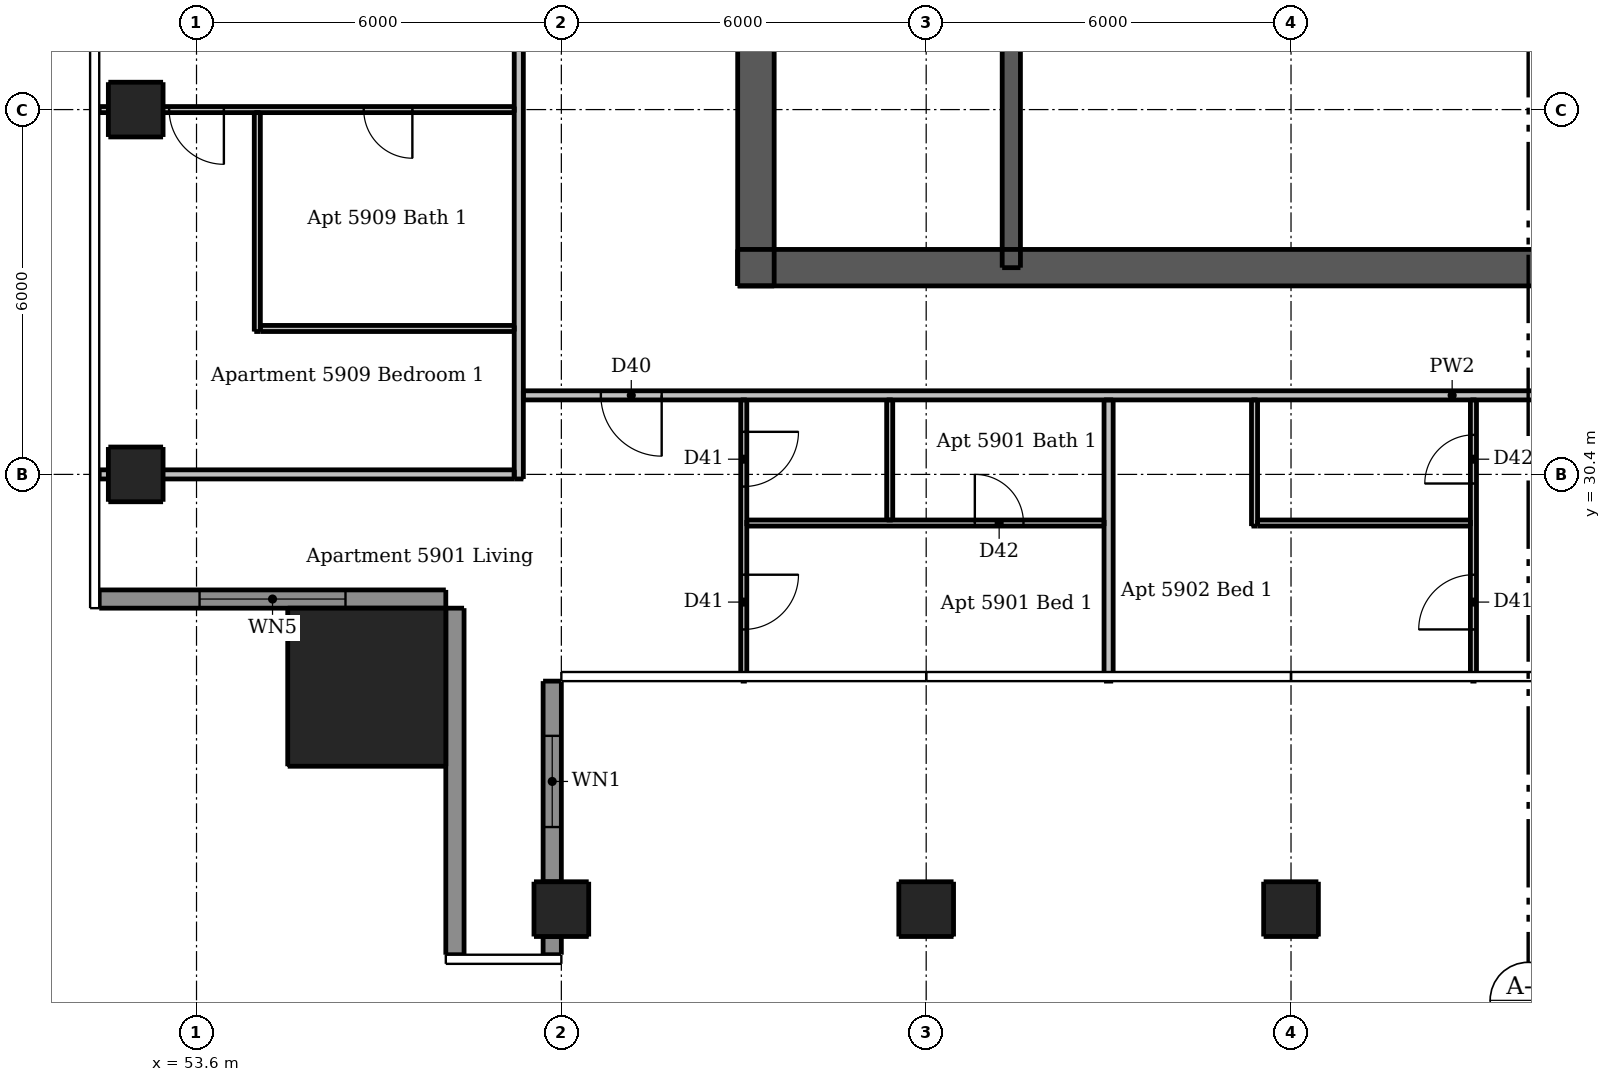
"""IFC4 building model, lengths in metres.
Left out: names, types, materials, properties, quantities, classifications, styles, units other than length and angle.
Written with IfcOpenShell. Run it as: python <this file> out.ifc"""

import sys

from ifc_helpers import new_model, si_unit, direction, frame, frame_2d, origin, origin_2d, place, context, subcontext, project, spatial, rectangle, extrude, element, fill, save


model = new_model("IFC4")
c1 = context("Model", 3, precision=1e-05, world=origin(), true_north=direction((0.0, 1.0)))
c2 = subcontext(c1, "Body", "Model", "MODEL_VIEW")
j1 = project(units=[si_unit("LENGTHUNIT", "METRE"), si_unit("PLANEANGLEUNIT", "RADIAN")], contexts=[c1])
p1 = place(None, origin())
s1 = spatial("IfcSite", under=j1, at=p1, CompositionType="ELEMENT")
p2 = place(p1, origin())
s2 = spatial("IfcBuilding", under=s1, at=p2, CompositionType="ELEMENT")
p3 = place(p2, frame((0.0, 0.0, 220.0)))
s3 = spatial("IfcBuildingStorey", under=s2, at=p3, CompositionType="ELEMENT", Elevation=220.0)
p4 = place(p3, frame((62.5, 33.8, 0.0), z_axis=(0.0, 0.0, 1.0), x_axis=(1.0, 0.0, 0.0)))
e1 = element("IfcWall", 1, at=p4, inside=s3, PredefinedType="SHEAR", context=c2, shape_type="SweptSolid", body=[
    extrude(rectangle(XDim=24.0, YDim=0.6, at=frame_2d((12.0, 0.0))), origin(), (0.0, 0.0, 1.0), 3.05),
])
p5 = place(p4, frame((1.925, 0.0, 0.0)))
e2 = element("IfcOpeningElement", 2, at=p5, cuts=e1, PredefinedType="OPENING", context=c2, shape_type="SweptSolid", body=[
    extrude(rectangle(XDim=1.1, YDim=2.1, at=frame_2d((0.55, 1.05))), frame((0.0, 0.31, 0.0), z_axis=(0.0, -1.0, 0.0), x_axis=(1.0, 0.0, 0.0)), (0.0, 0.0, 1.0), 0.62),
])
p6 = place(p4, frame((20.975, 0.0, 0.0)))
e3 = element("IfcOpeningElement", 3, at=p6, cuts=e1, PredefinedType="OPENING", context=c2, shape_type="SweptSolid", body=[
    extrude(rectangle(XDim=1.1, YDim=2.1, at=frame_2d((0.55, 1.05))), frame((0.0, 0.31, 0.0), z_axis=(0.0, -1.0, 0.0), x_axis=(1.0, 0.0, 0.0)), (0.0, 0.0, 1.0), 0.62),
])
p7 = place(p4, frame((8.0, 0.0, 0.0)))
e4 = element("IfcOpeningElement", 4, at=p7, cuts=e1, PredefinedType="OPENING", context=c2, shape_type="SweptSolid", body=[
    extrude(rectangle(XDim=1.1, YDim=2.1, at=frame_2d((0.55, 1.05))), frame((0.0, 0.31, 0.0), z_axis=(0.0, -1.0, 0.0), x_axis=(1.0, 0.0, 0.0)), (0.0, 0.0, 1.0), 0.62),
])
p8 = place(p4, frame((17.512, 0.0, 0.0)))
e5 = element("IfcOpeningElement", 5, at=p8, cuts=e1, PredefinedType="OPENING", context=c2, shape_type="SweptSolid", body=[
    extrude(rectangle(XDim=0.9, YDim=2.1, at=frame_2d((0.45, 1.05))), frame((0.0, 0.31, 0.0), z_axis=(0.0, -1.0, 0.0), x_axis=(1.0, 0.0, 0.0)), (0.0, 0.0, 1.0), 0.62),
])
p9 = place(p3, frame((62.8, 33.5, 0.0), z_axis=(0.0, 0.0, 1.0), x_axis=(0.0, 1.0, 0.0)))
e6 = element("IfcWall", 6, at=p9, inside=s3, PredefinedType="SHEAR", context=c2, shape_type="SweptSolid", body=[
    extrude(rectangle(XDim=24.0, YDim=0.6, at=frame_2d((12.0, 0.0))), origin(), (0.0, 0.0, 1.0), 3.05),
])
p10 = place(p9, frame((11.2, 0.0, 0.0)))
e7 = element("IfcOpeningElement", 7, at=p10, cuts=e6, PredefinedType="OPENING", context=c2, shape_type="SweptSolid", body=[
    extrude(rectangle(XDim=1.6, YDim=2.1, at=frame_2d((0.8, 1.05))), frame((0.0, 0.31, 0.0), z_axis=(0.0, -1.0, 0.0), x_axis=(1.0, 0.0, 0.0)), (0.0, 0.0, 1.0), 0.62),
])
p11 = place(p3, frame((67.0, 33.8, 0.0), z_axis=(0.0, 0.0, 1.0), x_axis=(0.0, 1.0, 0.0)))
e8 = element("IfcWall", 8, at=p11, inside=s3, PredefinedType="SHEAR", context=c2, shape_type="SweptSolid", body=[
    extrude(rectangle(XDim=10.1, YDim=0.3, at=frame_2d((5.05, 0.0))), origin(), (0.0, 0.0, 1.0), 3.05),
])
p12 = place(p11, frame((0.5, 0.0, 0.0)))
e9 = element("IfcOpeningElement", 9, at=p12, cuts=e8, PredefinedType="OPENING", context=c2, shape_type="SweptSolid", body=[
    extrude(rectangle(XDim=1.1, YDim=2.1, at=frame_2d((0.55, 1.05))), frame((0.0, 0.16, 0.0), z_axis=(0.0, -1.0, 0.0), x_axis=(1.0, 0.0, 0.0)), (0.0, 0.0, 1.0), 0.32),
])
for number, where, z_axis, x_axis in (
    (10, (59.6, 23.25, 0.0), (0.0, 0.0, 1.0), (1.0, 0.0, 0.0)),
    (11, (65.6, 23.25, 0.0), (0.0, 0.0, 1.0), (1.0, 0.0, 0.0)),
    (12, (71.6, 23.25, 0.0), (0.0, 0.0, 1.0), (1.0, 0.0, 0.0)),
    (13, (52.6, 30.4, 0.0), (0.0, 0.0, 1.0), (1.0, 0.0, 0.0)),
    (14, (52.6, 36.4, 0.0), (0.0, 0.0, 1.0), (1.0, 0.0, 0.0)),
):
    element("IfcColumn", number, at=place(p3, frame(where, z_axis=z_axis, x_axis=x_axis)), inside=s3, PredefinedType="COLUMN", context=c2, shape_type="SweptSolid", body=[
        extrude(rectangle(XDim=0.9, YDim=0.9, at=origin_2d()), origin(), (0.0, 0.0, 1.0), 3.05),
    ])
p13 = place(p3, frame((56.4, 26.9, 0.0), z_axis=(0.0, 0.0, 1.0), x_axis=(1.0, 0.0, 0.0)))
e15 = element("IfcColumn", 15, at=p13, inside=s3, PredefinedType="COLUMN", context=c2, shape_type="SweptSolid", body=[
    extrude(rectangle(XDim=2.6, YDim=2.6, at=origin_2d()), origin(), (0.0, 0.0, 1.0), 3.3),
])
p14 = place(p3, frame((59.45, 22.5, 0.0), z_axis=(0.0, 0.0, 1.0), x_axis=(0.0, 1.0, 0.0)))
e16 = element("IfcWall", 16, at=p14, inside=s3, PredefinedType="SOLIDWALL", context=c2, shape_type="SweptSolid", body=[
    extrude(rectangle(XDim=0.3, YDim=0.3, at=frame_2d((0.15, 0.0))), origin(), (0.0, 0.0, 1.0), 3.05),
])
p15 = place(p3, frame((59.45, 23.7, 0.0), z_axis=(0.0, 0.0, 1.0), x_axis=(0.0, 1.0, 0.0)))
e17 = element("IfcWall", 17, at=p15, inside=s3, PredefinedType="SOLIDWALL", context=c2, shape_type="SweptSolid", body=[
    extrude(rectangle(XDim=3.3, YDim=0.3, at=frame_2d((1.65, 0.0))), origin(), (0.0, 0.0, 1.0), 3.05),
])
p16 = place(p15, frame((0.9, 0.0, 0.9)))
e18 = element("IfcOpeningElement", 18, at=p16, cuts=e17, PredefinedType="OPENING", context=c2, shape_type="SweptSolid", body=[
    extrude(rectangle(XDim=1.5, YDim=1.5, at=frame_2d((0.75, 0.75))), frame((0.0, 0.16, 0.0), z_axis=(0.0, -1.0, 0.0), x_axis=(1.0, 0.0, 0.0)), (0.0, 0.0, 1.0), 0.32),
])
p17 = place(p3, frame((52.0, 28.35, 0.0), z_axis=(0.0, 0.0, 1.0), x_axis=(1.0, 0.0, 0.0)))
e19 = element("IfcWall", 19, at=p17, inside=s3, PredefinedType="SOLIDWALL", context=c2, shape_type="SweptSolid", body=[
    extrude(rectangle(XDim=5.7, YDim=0.3, at=frame_2d((2.85, 0.0))), origin(), (0.0, 0.0, 1.0), 3.05),
])
p18 = place(p17, frame((1.65, 0.0, 0.15)))
e20 = element("IfcOpeningElement", 20, at=p18, cuts=e19, PredefinedType="OPENING", context=c2, shape_type="SweptSolid", body=[
    extrude(rectangle(XDim=2.4, YDim=2.1, at=frame_2d((1.2, 1.05))), frame((0.0, 0.16, 0.0), z_axis=(0.0, -1.0, 0.0), x_axis=(1.0, 0.0, 0.0)), (0.0, 0.0, 1.0), 0.32),
])
p19 = place(p3, frame((57.85, 28.2, 0.0), z_axis=(0.0, 0.0, 1.0), x_axis=(0.0, -1.0, 0.0)))
e21 = element("IfcWall", 21, at=p19, inside=s3, PredefinedType="SOLIDWALL", context=c2, shape_type="SweptSolid", body=[
    extrude(rectangle(XDim=5.7, YDim=0.3, at=frame_2d((2.85, 0.0))), origin(), (0.0, 0.0, 1.0), 3.05),
])
p20 = place(p3, frame((54.6, 32.75, 0.0), z_axis=(0.0, 0.0, 1.0), x_axis=(0.0, 1.0, 0.0)))
e22 = element("IfcWall", 22, at=p20, inside=s3, PredefinedType="PARTITIONING", context=c2, shape_type="SweptSolid", body=[
    extrude(rectangle(XDim=3.6, YDim=0.1, at=frame_2d((1.8, 0.0))), origin(), (0.0, 0.0, 1.0), 3.05),
])
p21 = place(p3, frame((62.6, 31.625, 0.0), z_axis=(0.0, 0.0, 1.0), x_axis=(0.0, -1.0, 0.0)))
e23 = element("IfcWall", 23, at=p21, inside=s3, PredefinedType="PARTITIONING", context=c2, shape_type="SweptSolid", body=[
    extrude(rectangle(XDim=4.625, YDim=0.1, at=frame_2d((2.312, 0.0))), origin(), (0.0, 0.0, 1.0), 3.05),
])
p22 = place(p21, frame((0.525, 0.0, 0.0)))
e24 = element("IfcOpeningElement", 24, at=p22, cuts=e23, PredefinedType="OPENING", context=c2, shape_type="SweptSolid", body=[
    extrude(rectangle(XDim=0.9, YDim=2.1, at=frame_2d((0.45, 1.05))), frame((0.0, 0.06, 0.0), z_axis=(0.0, -1.0, 0.0), x_axis=(1.0, 0.0, 0.0)), (0.0, 0.0, 1.0), 0.12),
])
p23 = place(p21, frame((2.875, 0.0, 0.0)))
e25 = element("IfcOpeningElement", 25, at=p23, cuts=e23, PredefinedType="OPENING", context=c2, shape_type="SweptSolid", body=[
    extrude(rectangle(XDim=0.9, YDim=2.1, at=frame_2d((0.45, 1.05))), frame((0.0, 0.06, 0.0), z_axis=(0.0, -1.0, 0.0), x_axis=(1.0, 0.0, 0.0)), (0.0, 0.0, 1.0), 0.12),
])
p24 = place(p3, frame((65.0, 29.65, 0.0), z_axis=(0.0, 0.0, 1.0), x_axis=(0.0, 1.0, 0.0)))
e26 = element("IfcWall", 26, at=p24, inside=s3, PredefinedType="PARTITIONING", context=c2, shape_type="SweptSolid", body=[
    extrude(rectangle(XDim=1.975, YDim=0.1, at=frame_2d((0.988, 0.0))), origin(), (0.0, 0.0, 1.0), 3.05),
])
p25 = place(p3, frame((71.0, 29.55, 0.0), z_axis=(0.0, 0.0, 1.0), x_axis=(0.0, 1.0, 0.0)))
e27 = element("IfcWall", 27, at=p25, inside=s3, PredefinedType="PARTITIONING", context=c2, shape_type="SweptSolid", body=[
    extrude(rectangle(XDim=2.075, YDim=0.1, at=frame_2d((1.038, 0.0))), origin(), (0.0, 0.0, 1.0), 3.05),
])
p26 = place(p3, frame((74.6, 27.0, 0.0), z_axis=(0.0, 0.0, 1.0), x_axis=(0.0, 1.0, 0.0)))
e28 = element("IfcWall", 28, at=p26, inside=s3, PredefinedType="PARTITIONING", context=c2, shape_type="SweptSolid", body=[
    extrude(rectangle(XDim=4.625, YDim=0.1, at=frame_2d((2.312, 0.0))), origin(), (0.0, 0.0, 1.0), 3.05),
])
p27 = place(p26, frame((0.85, 0.0, 0.0)))
e29 = element("IfcOpeningElement", 29, at=p27, cuts=e28, PredefinedType="OPENING", context=c2, shape_type="SweptSolid", body=[
    extrude(rectangle(XDim=0.9, YDim=2.1, at=frame_2d((0.45, 1.05))), frame((0.0, 0.06, 0.0), z_axis=(0.0, -1.0, 0.0), x_axis=(1.0, 0.0, 0.0)), (0.0, 0.0, 1.0), 0.12),
])
p28 = place(p26, frame((3.25, 0.0, 0.0)))
e30 = element("IfcOpeningElement", 30, at=p28, cuts=e28, PredefinedType="OPENING", context=c2, shape_type="SweptSolid", body=[
    extrude(rectangle(XDim=0.8, YDim=2.1, at=frame_2d((0.4, 1.05))), frame((0.0, 0.06, 0.0), z_axis=(0.0, -1.0, 0.0), x_axis=(1.0, 0.0, 0.0)), (0.0, 0.0, 1.0), 0.12),
])
p29 = place(p3, frame((58.825, 36.4, 0.0), z_axis=(0.0, 0.0, 1.0), x_axis=(-1.0, 0.0, 0.0)))
e31 = element("IfcWall", 31, at=p29, inside=s3, PredefinedType="PARTITIONING", context=c2, shape_type="SweptSolid", body=[
    extrude(rectangle(XDim=6.825, YDim=0.1, at=frame_2d((3.413, 0.0))), origin(), (0.0, 0.0, 1.0), 2.516),
])
p30 = place(p29, frame((4.775, 0.0, 0.0)))
e32 = element("IfcOpeningElement", 32, at=p30, cuts=e31, PredefinedType="OPENING", context=c2, shape_type="SweptSolid", body=[
    extrude(rectangle(XDim=0.9, YDim=2.1, at=frame_2d((0.45, 1.05))), frame((0.0, 0.06, 0.0), z_axis=(0.0, -1.0, 0.0), x_axis=(1.0, 0.0, 0.0)), (0.0, 0.0, 1.0), 0.12),
])
p31 = place(p29, frame((1.675, 0.0, 0.0)))
e33 = element("IfcOpeningElement", 33, at=p31, cuts=e31, PredefinedType="OPENING", context=c2, shape_type="SweptSolid", body=[
    extrude(rectangle(XDim=0.8, YDim=2.1, at=frame_2d((0.4, 1.05))), frame((0.0, 0.06, 0.0), z_axis=(0.0, -1.0, 0.0), x_axis=(1.0, 0.0, 0.0)), (0.0, 0.0, 1.0), 0.12),
])
p32 = place(p3, frame((54.65, 32.8, 0.0), z_axis=(0.0, 0.0, 1.0), x_axis=(1.0, 0.0, 0.0)))
e34 = element("IfcWall", 34, at=p32, inside=s3, PredefinedType="PARTITIONING", context=c2, shape_type="SweptSolid", body=[
    extrude(rectangle(XDim=4.175, YDim=0.1, at=frame_2d((2.087, 0.0))), origin(), (0.0, 0.0, 1.0), 3.05),
])
p33 = place(p3, frame((62.65, 29.6, 0.0), z_axis=(0.0, 0.0, 1.0), x_axis=(1.0, 0.0, 0.0)))
e35 = element("IfcWall", 35, at=p33, inside=s3, PredefinedType="PARTITIONING", context=c2, shape_type="SweptSolid", body=[
    extrude(rectangle(XDim=5.875, YDim=0.1, at=frame_2d((2.938, 0.0))), origin(), (0.0, 0.0, 1.0), 3.05),
])
p34 = place(p33, frame((3.75, 0.0, 0.0)))
e36 = element("IfcOpeningElement", 36, at=p34, cuts=e35, PredefinedType="OPENING", context=c2, shape_type="SweptSolid", body=[
    extrude(rectangle(XDim=0.8, YDim=2.1, at=frame_2d((0.4, 1.05))), frame((0.0, 0.06, 0.0), z_axis=(0.0, -1.0, 0.0), x_axis=(1.0, 0.0, 0.0)), (0.0, 0.0, 1.0), 0.12),
])
p35 = place(p3, frame((71.05, 29.6, 0.0), z_axis=(0.0, 0.0, 1.0), x_axis=(1.0, 0.0, 0.0)))
e37 = element("IfcWall", 37, at=p35, inside=s3, PredefinedType="PARTITIONING", context=c2, shape_type="SweptSolid", body=[
    extrude(rectangle(XDim=3.5, YDim=0.1, at=frame_2d((1.75, 0.0))), origin(), (0.0, 0.0, 1.0), 3.05),
])
p36 = place(p3, frame((58.9, 30.325, 0.0), z_axis=(0.0, 0.0, 1.0), x_axis=(0.0, 1.0, 0.0)))
e38 = element("IfcWall", 38, at=p36, inside=s3, PredefinedType="PARTITIONING", context=c2, shape_type="SweptSolid", body=[
    extrude(rectangle(XDim=30.85, YDim=0.15, at=frame_2d((15.425, 0.0))), origin(), (0.0, 0.0, 1.0), 3.05),
])
p37 = place(p36, frame((7.375, 0.0, 0.0)))
e39 = element("IfcOpeningElement", 39, at=p37, cuts=e38, PredefinedType="OPENING", context=c2, shape_type="SweptSolid", body=[
    extrude(rectangle(XDim=1.0, YDim=2.1, at=frame_2d((0.5, 1.05))), frame((0.0, 0.085, 0.0), z_axis=(0.0, -1.0, 0.0), x_axis=(1.0, 0.0, 0.0)), (0.0, 0.0, 1.0), 0.17),
])
p38 = place(p36, frame((26.925, 0.0, 0.0)))
e40 = element("IfcOpeningElement", 40, at=p38, cuts=e38, PredefinedType="OPENING", context=c2, shape_type="SweptSolid", body=[
    extrude(rectangle(XDim=1.0, YDim=2.1, at=frame_2d((0.5, 1.05))), frame((0.0, 0.085, 0.0), z_axis=(0.0, -1.0, 0.0), x_axis=(1.0, 0.0, 0.0)), (0.0, 0.0, 1.0), 0.17),
])
p39 = place(p3, frame((68.6, 27.0, 0.0), z_axis=(0.0, 0.0, 1.0), x_axis=(0.0, 1.0, 0.0)))
e41 = element("IfcWall", 41, at=p39, inside=s3, PredefinedType="PARTITIONING", context=c2, shape_type="SweptSolid", body=[
    extrude(rectangle(XDim=4.625, YDim=0.15, at=frame_2d((2.312, 0.0))), origin(), (0.0, 0.0, 1.0), 3.05),
])
p40 = place(p3, frame((89.525, 31.7, 0.0), z_axis=(0.0, 0.0, 1.0), x_axis=(-1.0, 0.0, 0.0)))
e42 = element("IfcWall", 42, at=p40, inside=s3, PredefinedType="PARTITIONING", context=c2, shape_type="SweptSolid", body=[
    extrude(rectangle(XDim=30.55, YDim=0.15, at=frame_2d((15.275, 0.0))), origin(), (0.0, 0.0, 1.0), 3.05),
])
p41 = place(p40, frame((28.275, 0.0, 0.0)))
e43 = element("IfcOpeningElement", 43, at=p41, cuts=e42, PredefinedType="OPENING", context=c2, shape_type="SweptSolid", body=[
    extrude(rectangle(XDim=1.0, YDim=2.1, at=frame_2d((0.5, 1.05))), frame((0.0, 0.085, 0.0), z_axis=(0.0, -1.0, 0.0), x_axis=(1.0, 0.0, 0.0)), (0.0, 0.0, 1.0), 0.17),
])
p42 = place(p40, frame((12.625, 0.0, 0.0)))
e44 = element("IfcOpeningElement", 44, at=p42, cuts=e42, PredefinedType="OPENING", context=c2, shape_type="SweptSolid", body=[
    extrude(rectangle(XDim=1.0, YDim=2.1, at=frame_2d((0.5, 1.05))), frame((0.0, 0.085, 0.0), z_axis=(0.0, -1.0, 0.0), x_axis=(1.0, 0.0, 0.0)), (0.0, 0.0, 1.0), 0.17),
])
p43 = place(p40, frame((2.425, 0.0, 0.0)))
e45 = element("IfcOpeningElement", 45, at=p43, cuts=e42, PredefinedType="OPENING", context=c2, shape_type="SweptSolid", body=[
    extrude(rectangle(XDim=1.0, YDim=2.1, at=frame_2d((0.5, 1.05))), frame((0.0, 0.085, 0.0), z_axis=(0.0, -1.0, 0.0), x_axis=(1.0, 0.0, 0.0)), (0.0, 0.0, 1.0), 0.17),
])
p44 = place(p3, frame((52.0, 30.4, 0.0), z_axis=(0.0, 0.0, 1.0), x_axis=(1.0, 0.0, 0.0)))
e46 = element("IfcWall", 46, at=p44, inside=s3, PredefinedType="PARTITIONING", context=c2, shape_type="SweptSolid", body=[
    extrude(rectangle(XDim=6.825, YDim=0.15, at=frame_2d((3.413, 0.0))), origin(), (0.0, 0.0, 1.0), 2.647),
])
p45 = place(p16, origin())
e47 = element("IfcWindow", 47, at=p45, inside=s3, PartitioningType="DOUBLE_PANEL_VERTICAL", PredefinedType="WINDOW", context=c2, shape_type="SweptSolid", body=[
    extrude(rectangle(XDim=1.5, YDim=1.5, at=frame_2d((0.75, 0.75))), frame((0.0, 0.03, 0.0), z_axis=(0.0, -1.0, 0.0), x_axis=(1.0, 0.0, 0.0)), (0.0, 0.0, 1.0), 0.06),
])
fill(e18, e47)
p46 = place(p18, origin())
e48 = element("IfcWindow", 48, at=p46, inside=s3, PartitioningType="DOUBLE_PANEL_VERTICAL", PredefinedType="WINDOW", context=c2, shape_type="SweptSolid", body=[
    extrude(rectangle(XDim=2.4, YDim=2.1, at=frame_2d((1.2, 1.05))), frame((0.0, 0.03, 0.0), z_axis=(0.0, -1.0, 0.0), x_axis=(1.0, 0.0, 0.0)), (0.0, 0.0, 1.0), 0.06),
])
fill(e20, e48)
p47 = place(p5, origin())
e49 = element("IfcDoor", 49, at=p47, inside=s3, OperationType="SINGLE_SWING_LEFT", PredefinedType="DOOR", context=c2, shape_type="SweptSolid", body=[
    extrude(rectangle(XDim=1.1, YDim=2.1, at=frame_2d((0.55, 1.05))), frame((0.0, 0.288, 0.0), z_axis=(0.0, -1.0, 0.0), x_axis=(1.0, 0.0, 0.0)), (0.0, 0.0, 1.0), 0.05),
])
fill(e2, e49)
p48 = place(p7, origin())
e50 = element("IfcDoor", 50, at=p48, inside=s3, OperationType="SINGLE_SWING_LEFT", PredefinedType="DOOR", context=c2, shape_type="SweptSolid", body=[
    extrude(rectangle(XDim=1.1, YDim=2.1, at=frame_2d((0.55, 1.05))), frame((0.0, 0.288, 0.0), z_axis=(0.0, -1.0, 0.0), x_axis=(1.0, 0.0, 0.0)), (0.0, 0.0, 1.0), 0.05),
])
fill(e4, e50)
p49 = place(p12, origin())
e51 = element("IfcDoor", 51, at=p49, inside=s3, OperationType="SINGLE_SWING_RIGHT", PredefinedType="DOOR", context=c2, shape_type="SweptSolid", body=[
    extrude(rectangle(XDim=1.1, YDim=2.1, at=frame_2d((0.55, 1.05))), frame((0.0, -0.087, 0.0), z_axis=(0.0, -1.0, 0.0), x_axis=(1.0, 0.0, 0.0)), (0.0, 0.0, 1.0), 0.05),
])
fill(e9, e51)
p50 = place(p41, origin())
e52 = element("IfcDoor", 52, at=p50, inside=s3, OperationType="SINGLE_SWING_LEFT", PredefinedType="DOOR", context=c2, shape_type="SweptSolid", body=[
    extrude(rectangle(XDim=1.0, YDim=2.1, at=frame_2d((0.5, 1.05))), frame((0.0, 0.025, 0.0), z_axis=(0.0, -1.0, 0.0), x_axis=(1.0, 0.0, 0.0)), (0.0, 0.0, 1.0), 0.05),
])
fill(e43, e52)
p51 = place(p22, origin())
e53 = element("IfcDoor", 53, at=p51, inside=s3, OperationType="SINGLE_SWING_LEFT", PredefinedType="DOOR", context=c2, shape_type="SweptSolid", body=[
    extrude(rectangle(XDim=0.9, YDim=2.1, at=frame_2d((0.45, 1.05))), frame((0.0, 0.025, 0.0), z_axis=(0.0, -1.0, 0.0), x_axis=(1.0, 0.0, 0.0)), (0.0, 0.0, 1.0), 0.05),
])
fill(e24, e53)
p52 = place(p23, origin())
e54 = element("IfcDoor", 54, at=p52, inside=s3, OperationType="SINGLE_SWING_LEFT", PredefinedType="DOOR", context=c2, shape_type="SweptSolid", body=[
    extrude(rectangle(XDim=0.9, YDim=2.1, at=frame_2d((0.45, 1.05))), frame((0.0, 0.025, 0.0), z_axis=(0.0, -1.0, 0.0), x_axis=(1.0, 0.0, 0.0)), (0.0, 0.0, 1.0), 0.05),
])
fill(e25, e54)
p53 = place(p34, origin())
e55 = element("IfcDoor", 55, at=p53, inside=s3, OperationType="SINGLE_SWING_LEFT", PredefinedType="DOOR", context=c2, shape_type="SweptSolid", body=[
    extrude(rectangle(XDim=0.8, YDim=2.1, at=frame_2d((0.4, 1.05))), frame((0.0, 0.025, 0.0), z_axis=(0.0, -1.0, 0.0), x_axis=(1.0, 0.0, 0.0)), (0.0, 0.0, 1.0), 0.05),
])
fill(e36, e55)
p54 = place(p27, origin())
e56 = element("IfcDoor", 56, at=p54, inside=s3, OperationType="SINGLE_SWING_LEFT", PredefinedType="DOOR", context=c2, shape_type="SweptSolid", body=[
    extrude(rectangle(XDim=0.9, YDim=2.1, at=frame_2d((0.45, 1.05))), frame((0.0, 0.025, 0.0), z_axis=(0.0, -1.0, 0.0), x_axis=(1.0, 0.0, 0.0)), (0.0, 0.0, 1.0), 0.05),
])
fill(e29, e56)
p55 = place(p28, origin())
e57 = element("IfcDoor", 57, at=p55, inside=s3, OperationType="SINGLE_SWING_LEFT", PredefinedType="DOOR", context=c2, shape_type="SweptSolid", body=[
    extrude(rectangle(XDim=0.8, YDim=2.1, at=frame_2d((0.4, 1.05))), frame((0.0, 0.025, 0.0), z_axis=(0.0, -1.0, 0.0), x_axis=(1.0, 0.0, 0.0)), (0.0, 0.0, 1.0), 0.05),
])
fill(e30, e57)
p56 = place(p30, origin())
e58 = element("IfcDoor", 58, at=p56, inside=s3, OperationType="SINGLE_SWING_LEFT", PredefinedType="DOOR", context=c2, shape_type="SweptSolid", body=[
    extrude(rectangle(XDim=0.9, YDim=2.1, at=frame_2d((0.45, 1.05))), frame((0.0, 0.025, 0.0), z_axis=(0.0, -1.0, 0.0), x_axis=(1.0, 0.0, 0.0)), (0.0, 0.0, 1.0), 0.05),
])
fill(e32, e58)
p57 = place(p31, origin())
e59 = element("IfcDoor", 59, at=p57, inside=s3, OperationType="SINGLE_SWING_LEFT", PredefinedType="DOOR", context=c2, shape_type="SweptSolid", body=[
    extrude(rectangle(XDim=0.8, YDim=2.1, at=frame_2d((0.4, 1.05))), frame((0.0, 0.025, 0.0), z_axis=(0.0, -1.0, 0.0), x_axis=(1.0, 0.0, 0.0)), (0.0, 0.0, 1.0), 0.05),
])
fill(e33, e59)
save(model, sys.argv[1])
